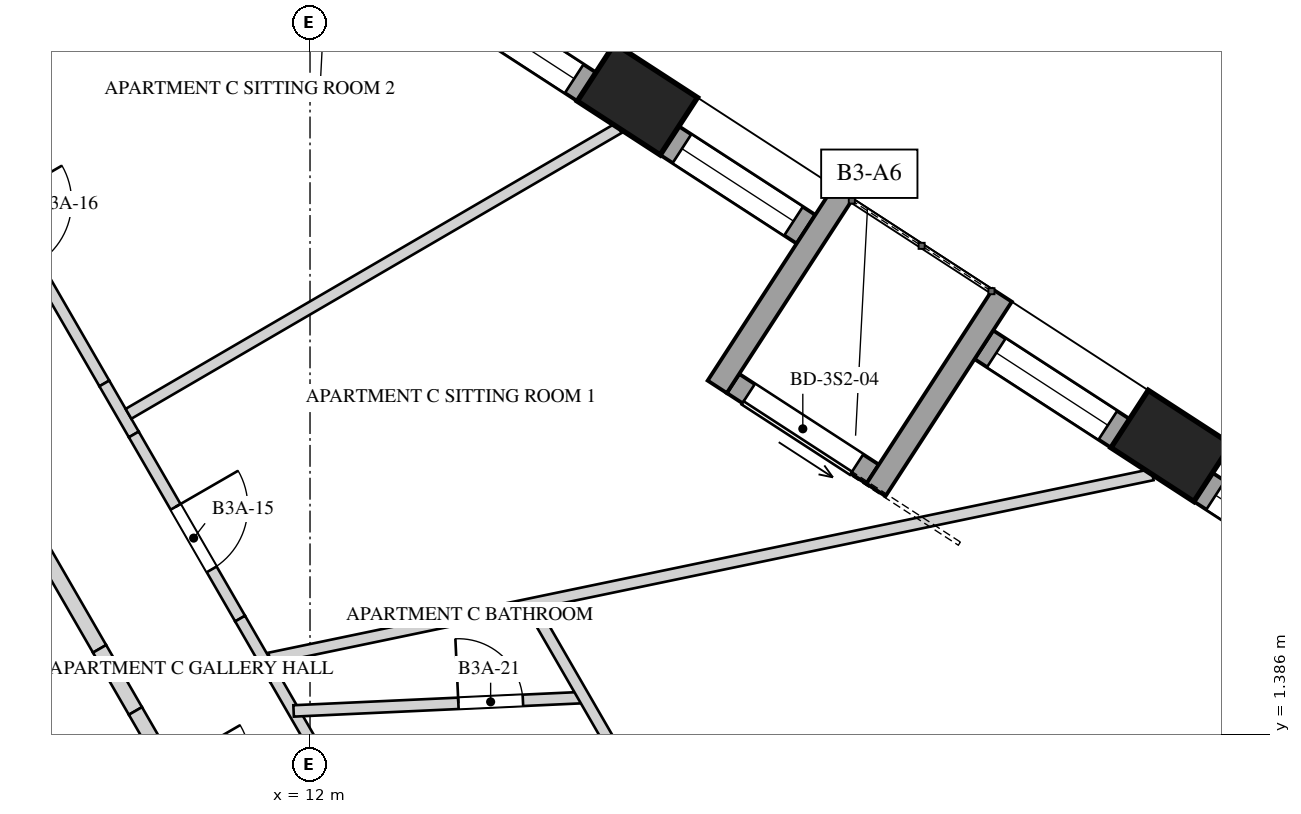
"""IFC4 building model, lengths in metres.
Left out: names, types, materials, properties, quantities, classifications, styles, units other than length and angle.
Written with IfcOpenShell. Run it as: python <this file> out.ifc"""

import sys

from ifc_helpers import new_model, si_unit, direction, frame, frame_2d, origin, origin_2d, place, context, subcontext, project, spatial, rectangle, extrude, element, fill, save


model = new_model("IFC4")
c1 = context("Model", 3, precision=1e-05, world=origin(), true_north=direction((0.0, 1.0)))
c2 = subcontext(c1, "Body", "Model", "MODEL_VIEW")
j1 = project(units=[si_unit("LENGTHUNIT", "METRE"), si_unit("PLANEANGLEUNIT", "RADIAN")], contexts=[c1])
p1 = place(None, origin())
s1 = spatial("IfcSite", under=j1, at=p1, CompositionType="ELEMENT")
p2 = place(p1, origin())
s2 = spatial("IfcBuilding", under=s1, at=p2, CompositionType="ELEMENT")
p3 = place(p2, frame((0.0, 0.0, 133.6)))
s3 = spatial("IfcBuildingStorey", under=s2, at=p3, CompositionType="ELEMENT", Elevation=133.6)
p4 = place(p3, frame((9.729, -4.25, 0.0), z_axis=(0.0, 0.0, 1.0), x_axis=(-0.500004814304, 0.866022624227, 0.0)))
e1 = element("IfcWall", 1, at=p4, inside=s3, PredefinedType="SHEAR", context=c2, shape_type="SweptSolid", body=[
    extrude(rectangle(XDim=17.09, YDim=0.9, at=frame_2d((8.545, 0.0))), origin(), (0.0, 0.0, 1.0), 4.0),
])
p5 = place(p4, frame((6.82, 0.0, 0.0)))
e2 = element("IfcOpeningElement", 2, at=p5, cuts=e1, PredefinedType="OPENING", context=c2, shape_type="SweptSolid", body=[
    extrude(rectangle(XDim=1.0, YDim=2.4, at=frame_2d((0.5, 1.2))), frame((0.0, 0.46, 0.0), z_axis=(0.0, -1.0, 0.0), x_axis=(1.0, 0.0, 0.0)), (0.0, 0.0, 1.0), 0.92),
])
for number, where, z_axis, x_axis in (
    (3, (23.328, 5.18, 0.0), (0.0, 0.0, 1.0), (-0.839, 0.545, 0.0)),
    (4, (16.307, 9.74, 0.0), (0.0, 0.0, 1.0), (-0.839, 0.545, 0.0)),
):
    element("IfcColumn", number, at=place(p3, frame(where, z_axis=z_axis, x_axis=x_axis)), inside=s3, PredefinedType="COLUMN", context=c2, shape_type="SweptSolid", body=[
        extrude(rectangle(XDim=1.3, YDim=0.9, at=origin_2d()), origin(), (0.0, 0.0, 1.0), 4.0),
    ])
p6 = place(p3, frame((25.546, 3.472, 0.0), z_axis=(0.0, 0.0, 1.0), x_axis=(-0.838675466927, 0.544631491171, 0.0)))
e5 = element("IfcWall", 5, at=p6, inside=s3, PredefinedType="SOLIDWALL", context=c2, shape_type="SweptSolid", body=[
    extrude(rectangle(XDim=2.14, YDim=0.45, at=frame_2d((1.07, 0.0))), origin(), (0.0, 0.0, 1.0), 3.3),
])
p7 = place(p6, frame((0.195, 0.0, 0.5)))
e6 = element("IfcOpeningElement", 6, at=p7, cuts=e5, PredefinedType="OPENING", context=c2, shape_type="SweptSolid", body=[
    extrude(rectangle(XDim=1.75, YDim=2.65, at=frame_2d((0.875, 1.325))), frame((0.0, 0.235, 0.0), z_axis=(0.0, -1.0, 0.0), x_axis=(1.0, 0.0, 0.0)), (0.0, 0.0, 1.0), 0.47),
])
p8 = place(p3, frame((22.66, 5.346, 0.0), z_axis=(0.0, 0.0, 1.0), x_axis=(-0.838675466927, 0.544631491171, 0.0)))
e7 = element("IfcWall", 7, at=p8, inside=s3, PredefinedType="SOLIDWALL", context=c2, shape_type="SweptSolid", body=[
    extrude(rectangle(XDim=2.14, YDim=0.45, at=frame_2d((1.07, 0.0))), origin(), (0.0, 0.0, 1.0), 3.3),
])
p9 = place(p8, frame((0.195, 0.0, 0.5)))
e8 = element("IfcOpeningElement", 8, at=p9, cuts=e7, PredefinedType="OPENING", context=c2, shape_type="SweptSolid", body=[
    extrude(rectangle(XDim=1.75, YDim=2.0, at=frame_2d((0.875, 1.0))), frame((0.0, 0.235, 0.0), z_axis=(0.0, -1.0, 0.0), x_axis=(1.0, 0.0, 0.0)), (0.0, 0.0, 1.0), 0.47),
])
p10 = place(p3, frame((18.525, 8.031, 0.0), z_axis=(0.0, 0.0, 1.0), x_axis=(-0.838675466927, 0.544631491171, 0.0)))
e9 = element("IfcWall", 9, at=p10, inside=s3, PredefinedType="SOLIDWALL", context=c2, shape_type="SweptSolid", body=[
    extrude(rectangle(XDim=2.14, YDim=0.45, at=frame_2d((1.07, 0.0))), origin(), (0.0, 0.0, 1.0), 3.3),
])
p11 = place(p10, frame((0.195, 0.0, 0.5)))
e10 = element("IfcOpeningElement", 10, at=p11, cuts=e9, PredefinedType="OPENING", context=c2, shape_type="SweptSolid", body=[
    extrude(rectangle(XDim=1.75, YDim=2.65, at=frame_2d((0.875, 1.325))), frame((0.0, 0.235, 0.0), z_axis=(0.0, -1.0, 0.0), x_axis=(1.0, 0.0, 0.0)), (0.0, 0.0, 1.0), 0.47),
])
p12 = place(p3, frame((15.639, 9.905, 0.0), z_axis=(0.0, 0.0, 1.0), x_axis=(-0.838677021821, 0.54462909679, 0.0)))
e11 = element("IfcWall", 11, at=p12, inside=s3, PredefinedType="SOLIDWALL", context=c2, shape_type="SweptSolid", body=[
    extrude(rectangle(XDim=7.072, YDim=0.45, at=frame_2d((3.536, 0.0))), origin(), (0.0, 0.0, 1.0), 3.3),
])
p13 = place(p12, frame((0.195, 0.0, 0.5)))
e12 = element("IfcOpeningElement", 12, at=p13, cuts=e11, PredefinedType="OPENING", context=c2, shape_type="SweptSolid", body=[
    extrude(rectangle(XDim=1.75, YDim=2.65, at=frame_2d((0.875, 1.325))), frame((0.0, 0.235, 0.0), z_axis=(0.0, -1.0, 0.0), x_axis=(1.0, 0.0, 0.0)), (0.0, 0.0, 1.0), 0.47),
])
p14 = place(p12, frame((2.661, 0.0, 0.5)))
e13 = element("IfcOpeningElement", 13, at=p14, cuts=e11, PredefinedType="OPENING", context=c2, shape_type="SweptSolid", body=[
    extrude(rectangle(XDim=1.75, YDim=2.65, at=frame_2d((0.875, 1.325))), frame((0.0, 0.235, 0.0), z_axis=(0.0, -1.0, 0.0), x_axis=(1.0, 0.0, 0.0)), (0.0, 0.0, 1.0), 0.47),
])
p15 = place(p12, frame((5.126, 0.0, 0.5)))
e14 = element("IfcOpeningElement", 14, at=p15, cuts=e11, PredefinedType="OPENING", context=c2, shape_type="SweptSolid", body=[
    extrude(rectangle(XDim=1.75, YDim=2.65, at=frame_2d((0.875, 1.325))), frame((0.0, 0.235, 0.0), z_axis=(0.0, -1.0, 0.0), x_axis=(1.0, 0.0, 0.0)), (0.0, 0.0, 1.0), 0.47),
])
p16 = place(p3, frame((19.402, 4.809, 0.0), z_axis=(0.0, 0.0, 1.0), x_axis=(-0.838659986147, 0.544655329209, 0.0)))
e15 = element("IfcWall", 15, at=p16, inside=s3, PredefinedType="SOLIDWALL", context=c2, shape_type="SweptSolid", body=[
    extrude(rectangle(XDim=2.191, YDim=0.3, at=frame_2d((1.095, 0.0))), origin(), (0.0, 0.0, 1.0), 3.3),
])
p17 = place(p16, frame((0.245, 0.0, 0.0)))
e16 = element("IfcOpeningElement", 16, at=p17, cuts=e15, PredefinedType="OPENING", context=c2, shape_type="SweptSolid", body=[
    extrude(rectangle(XDim=1.7, YDim=2.45, at=frame_2d((0.85, 1.225))), frame((0.0, 0.16, 0.0), z_axis=(0.0, -1.0, 0.0), x_axis=(1.0, 0.0, 0.0)), (0.0, 0.0, 1.0), 0.32),
])
for number, where, z_axis, x_axis in (
    (17, (21.107, 7.159, 0.0), (0.0, 0.0, 1.0), (-0.545, -0.839, 0.0)),
    (18, (19.018, 8.516, 0.0), (0.0, 0.0, 1.0), (-0.545, -0.839, 0.0)),
):
    element("IfcWall", number, at=place(p3, frame(where, z_axis=z_axis, x_axis=x_axis)), inside=s3, PredefinedType="SOLIDWALL", context=c2, shape_type="SweptSolid", body=[
        extrude(rectangle(XDim=3.05, YDim=0.3, at=frame_2d((1.525, 0.0))), origin(), (0.0, 0.0, 1.0), 3.3),
    ])
p18 = place(p3, frame((6.944, 10.073, 0.0), z_axis=(0.0, 0.0, 1.0), x_axis=(0.499993726502, -0.86602902576, 0.0)))
e19 = element("IfcWall", 19, at=p18, inside=s3, PredefinedType="PARTITIONING", context=c2, shape_type="SweptSolid", body=[
    extrude(rectangle(XDim=4.7, YDim=0.15, at=frame_2d((2.35, 0.0))), origin(), (0.0, 0.0, 1.0), 3.65),
])
p19 = place(p18, frame((1.94, 0.0, 0.0)))
e20 = element("IfcOpeningElement", 20, at=p19, cuts=e19, PredefinedType="OPENING", context=c2, shape_type="SweptSolid", body=[
    extrude(rectangle(XDim=0.95, YDim=2.4, at=frame_2d((0.475, 1.2))), frame((0.0, 0.085, 0.0), z_axis=(0.0, -1.0, 0.0), x_axis=(1.0, 0.0, 0.0)), (0.0, 0.0, 1.0), 0.17),
])
p20 = place(p3, frame((9.294, 6.002, 0.0), z_axis=(0.0, 0.0, 1.0), x_axis=(0.499831512295, -0.866122658356, 0.0)))
e21 = element("IfcWall", 21, at=p20, inside=s3, PredefinedType="PARTITIONING", context=c2, shape_type="SweptSolid", body=[
    extrude(rectangle(XDim=0.775, YDim=0.15, at=frame_2d((0.388, 0.0))), origin(), (0.0, 0.0, 1.0), 2.75),
])
p21 = place(p3, frame((9.681, 5.331, 0.0), z_axis=(0.0, 0.0, 1.0), x_axis=(0.500034735108, -0.866005348532, 0.0)))
e22 = element("IfcWall", 22, at=p21, inside=s3, PredefinedType="PARTITIONING", context=c2, shape_type="SweptSolid", body=[
    extrude(rectangle(XDim=2.797, YDim=0.15, at=frame_2d((1.398, 0.0))), origin(), (0.0, 0.0, 1.0), 3.65),
])
p22 = place(p21, frame((1.1, 0.0, 0.0)))
e23 = element("IfcOpeningElement", 23, at=p22, cuts=e22, PredefinedType="OPENING", context=c2, shape_type="SweptSolid", body=[
    extrude(rectangle(XDim=0.95, YDim=2.4, at=frame_2d((0.475, 1.2))), frame((0.0, 0.085, 0.0), z_axis=(0.0, -1.0, 0.0), x_axis=(1.0, 0.0, 0.0)), (0.0, 0.0, 1.0), 0.17),
])
p23 = place(p3, frame((11.08, 2.909, 0.0), z_axis=(0.0, 0.0, 1.0), x_axis=(0.500060322201, -0.865990573944, 0.0)))
e24 = element("IfcWall", 24, at=p23, inside=s3, PredefinedType="PARTITIONING", context=c2, shape_type="SweptSolid", body=[
    extrude(rectangle(XDim=0.917, YDim=0.15, at=frame_2d((0.459, 0.0))), origin(), (0.0, 0.0, 1.0), 2.55),
])
p24 = place(p3, frame((11.539, 2.114, 0.0), z_axis=(0.0, 0.0, 1.0), x_axis=(0.499986163319, -0.866033392248, 0.0)))
e25 = element("IfcWall", 25, at=p24, inside=s3, PredefinedType="PARTITIONING", context=c2, shape_type="SweptSolid", body=[
    extrude(rectangle(XDim=1.549, YDim=0.15, at=frame_2d((0.775, 0.0))), origin(), (0.0, 0.0, 1.0), 3.65),
])
p25 = place(p3, frame((9.041, 13.922, 0.0), z_axis=(0.0, 0.0, 1.0), x_axis=(-0.544639775338, -0.838670087174, 0.0)))
e26 = element("IfcWall", 26, at=p25, inside=s3, PredefinedType="SOLIDWALL", context=c2, shape_type="SweptSolid", body=[
    extrude(rectangle(XDim=6.106, YDim=0.25, at=frame_2d((3.053, 0.0))), origin(), (0.0, 0.0, 1.0), 2.95),
])
p26 = place(p3, frame((9.612, 5.603, 0.0), z_axis=(0.0, 0.0, 1.0), x_axis=(0.863953189991, 0.503572125425, 0.0)))
e27 = element("IfcWall", 27, at=p26, inside=s3, PredefinedType="PARTITIONING", context=c2, shape_type="SweptSolid", body=[
    extrude(rectangle(XDim=7.466, YDim=0.15, at=frame_2d((3.733, 0.0))), origin(), (0.0, 0.0, 1.0), 2.75),
])
p27 = place(p3, frame((11.468, 2.386, 0.0), z_axis=(0.0, 0.0, 1.0), x_axis=(0.979030724859, 0.203712640211, 0.0)))
e28 = element("IfcWall", 28, at=p27, inside=s3, PredefinedType="PARTITIONING", context=c2, shape_type="SweptSolid", body=[
    extrude(rectangle(XDim=11.864, YDim=0.15, at=frame_2d((5.932, 0.0))), origin(), (0.0, 0.0, 1.0), 2.55),
])
p28 = place(p3, frame((11.784, 1.694, 0.0), z_axis=(0.0, 0.0, 1.0), x_axis=(0.998933757579, 0.046166524337, 0.0)))
e29 = element("IfcWall", 29, at=p28, inside=s3, PredefinedType="PARTITIONING", context=c2, shape_type="SweptSolid", body=[
    extrude(rectangle(XDim=3.823, YDim=0.15, at=frame_2d((1.912, 0.0))), origin(), (0.0, 0.0, 1.0), 3.65),
])
p29 = place(p28, frame((2.17, 0.0, 0.0)))
e30 = element("IfcOpeningElement", 30, at=p29, cuts=e29, PredefinedType="OPENING", context=c2, shape_type="SweptSolid", body=[
    extrude(rectangle(XDim=0.85, YDim=2.4, at=frame_2d((0.425, 1.2))), frame((0.0, 0.085, 0.0), z_axis=(0.0, -1.0, 0.0), x_axis=(1.0, 0.0, 0.0)), (0.0, 0.0, 1.0), 0.17),
])
p30 = place(p3, frame((14.936, 3.031, 0.0), z_axis=(0.0, 0.0, 1.0), x_axis=(0.499298623879, -0.866429964967, 0.0)))
e31 = element("IfcWall", 31, at=p30, inside=s3, PredefinedType="PARTITIONING", context=c2, shape_type="SweptSolid", body=[
    extrude(rectangle(XDim=0.166, YDim=0.15, at=frame_2d((0.083, 0.0))), origin(), (0.0, 0.0, 1.0), 2.55),
])
p31 = place(p3, frame((15.019, 2.887, 0.0), z_axis=(0.0, 0.0, 1.0), x_axis=(0.50006548692, -0.865987591592, 0.0)))
e32 = element("IfcWall", 32, at=p31, inside=s3, PredefinedType="PARTITIONING", context=c2, shape_type="SweptSolid", body=[
    extrude(rectangle(XDim=2.321, YDim=0.15, at=frame_2d((1.16, 0.0))), origin(), (0.0, 0.0, 1.0), 3.65),
])
p32 = place(p3, frame((8.142, 4.397, 0.0), z_axis=(0.0, 0.0, 1.0), x_axis=(0.499948868167, -0.866054922749, 0.0)))
e33 = element("IfcWall", 33, at=p32, inside=s3, PredefinedType="SOLIDWALL", context=c2, shape_type="SweptSolid", body=[
    extrude(rectangle(XDim=2.178, YDim=0.2, at=frame_2d((1.089, 0.0))), origin(), (0.0, 0.0, 1.0), 3.65),
])
p33 = place(p3, frame((9.231, 2.511, 0.0), z_axis=(0.0, 0.0, 1.0), x_axis=(0.500118100521, -0.865957207679, 0.0)))
e34 = element("IfcWall", 34, at=p33, inside=s3, PredefinedType="SOLIDWALL", context=c2, shape_type="SweptSolid", body=[
    extrude(rectangle(XDim=0.944, YDim=0.2, at=frame_2d((0.472, 0.0))), origin(), (0.0, 0.0, 1.0), 2.55),
])
p34 = place(p3, frame((9.703, 1.694, 0.0), z_axis=(0.0, 0.0, 1.0), x_axis=(0.499942357345, -0.866058681229, 0.0)))
e35 = element("IfcWall", 35, at=p34, inside=s3, PredefinedType="SOLIDWALL", context=c2, shape_type="SweptSolid", body=[
    extrude(rectangle(XDim=0.801, YDim=0.2, at=frame_2d((0.4, 0.0))), origin(), (0.0, 0.0, 1.0), 3.65),
])
p35 = place(p7, origin())
e36 = element("IfcWindow", 36, at=p35, inside=s3, PartitioningType="SINGLE_PANEL", PredefinedType="WINDOW", context=c2, shape_type="SweptSolid", body=[
    extrude(rectangle(XDim=1.75, YDim=2.65, at=frame_2d((0.875, 1.325))), frame((0.0, 0.03, 0.0), z_axis=(0.0, -1.0, 0.0), x_axis=(1.0, 0.0, 0.0)), (0.0, 0.0, 1.0), 0.06),
])
fill(e6, e36)
p36 = place(p9, origin())
e37 = element("IfcWindow", 37, at=p36, inside=s3, PartitioningType="SINGLE_PANEL", PredefinedType="WINDOW", context=c2, shape_type="SweptSolid", body=[
    extrude(rectangle(XDim=1.75, YDim=2.0, at=frame_2d((0.875, 1.0))), frame((0.0, 0.03, 0.0), z_axis=(0.0, -1.0, 0.0), x_axis=(1.0, 0.0, 0.0)), (0.0, 0.0, 1.0), 0.06),
])
fill(e8, e37)
p37 = place(p11, origin())
e38 = element("IfcWindow", 38, at=p37, inside=s3, PartitioningType="SINGLE_PANEL", PredefinedType="WINDOW", context=c2, shape_type="SweptSolid", body=[
    extrude(rectangle(XDim=1.75, YDim=2.65, at=frame_2d((0.875, 1.325))), frame((0.0, 0.03, 0.0), z_axis=(0.0, -1.0, 0.0), x_axis=(1.0, 0.0, 0.0)), (0.0, 0.0, 1.0), 0.06),
])
fill(e10, e38)
p38 = place(p13, origin())
e39 = element("IfcWindow", 39, at=p38, inside=s3, PartitioningType="SINGLE_PANEL", PredefinedType="WINDOW", context=c2, shape_type="SweptSolid", body=[
    extrude(rectangle(XDim=1.75, YDim=2.65, at=frame_2d((0.875, 1.325))), frame((0.0, 0.03, 0.0), z_axis=(0.0, -1.0, 0.0), x_axis=(1.0, 0.0, 0.0)), (0.0, 0.0, 1.0), 0.06),
])
fill(e12, e39)
p39 = place(p17, origin())
e40 = element("IfcDoor", 40, at=p39, inside=s3, OperationType="SLIDING_TO_LEFT", PredefinedType="DOOR", context=c2, shape_type="SweptSolid", body=[
    extrude(rectangle(XDim=1.7, YDim=2.45, at=frame_2d((0.85, 1.225))), frame((0.0, 0.025, 0.0), z_axis=(0.0, -1.0, 0.0), x_axis=(1.0, 0.0, 0.0)), (0.0, 0.0, 1.0), 0.05),
])
fill(e16, e40)
p40 = place(p22, origin())
e41 = element("IfcDoor", 41, at=p40, inside=s3, OperationType="SINGLE_SWING_LEFT", PredefinedType="DOOR", context=c2, shape_type="SweptSolid", body=[
    extrude(rectangle(XDim=0.95, YDim=2.4, at=frame_2d((0.475, 1.2))), frame((0.0, 0.025, 0.0), z_axis=(0.0, -1.0, 0.0), x_axis=(1.0, 0.0, 0.0)), (0.0, 0.0, 1.0), 0.05),
])
fill(e23, e41)
p41 = place(p29, origin())
e42 = element("IfcDoor", 42, at=p41, inside=s3, OperationType="SINGLE_SWING_LEFT", PredefinedType="DOOR", context=c2, shape_type="SweptSolid", body=[
    extrude(rectangle(XDim=0.85, YDim=2.4, at=frame_2d((0.425, 1.2))), frame((0.0, 0.025, 0.0), z_axis=(0.0, -1.0, 0.0), x_axis=(1.0, 0.0, 0.0)), (0.0, 0.0, 1.0), 0.05),
])
fill(e30, e42)
save(model, sys.argv[1])
